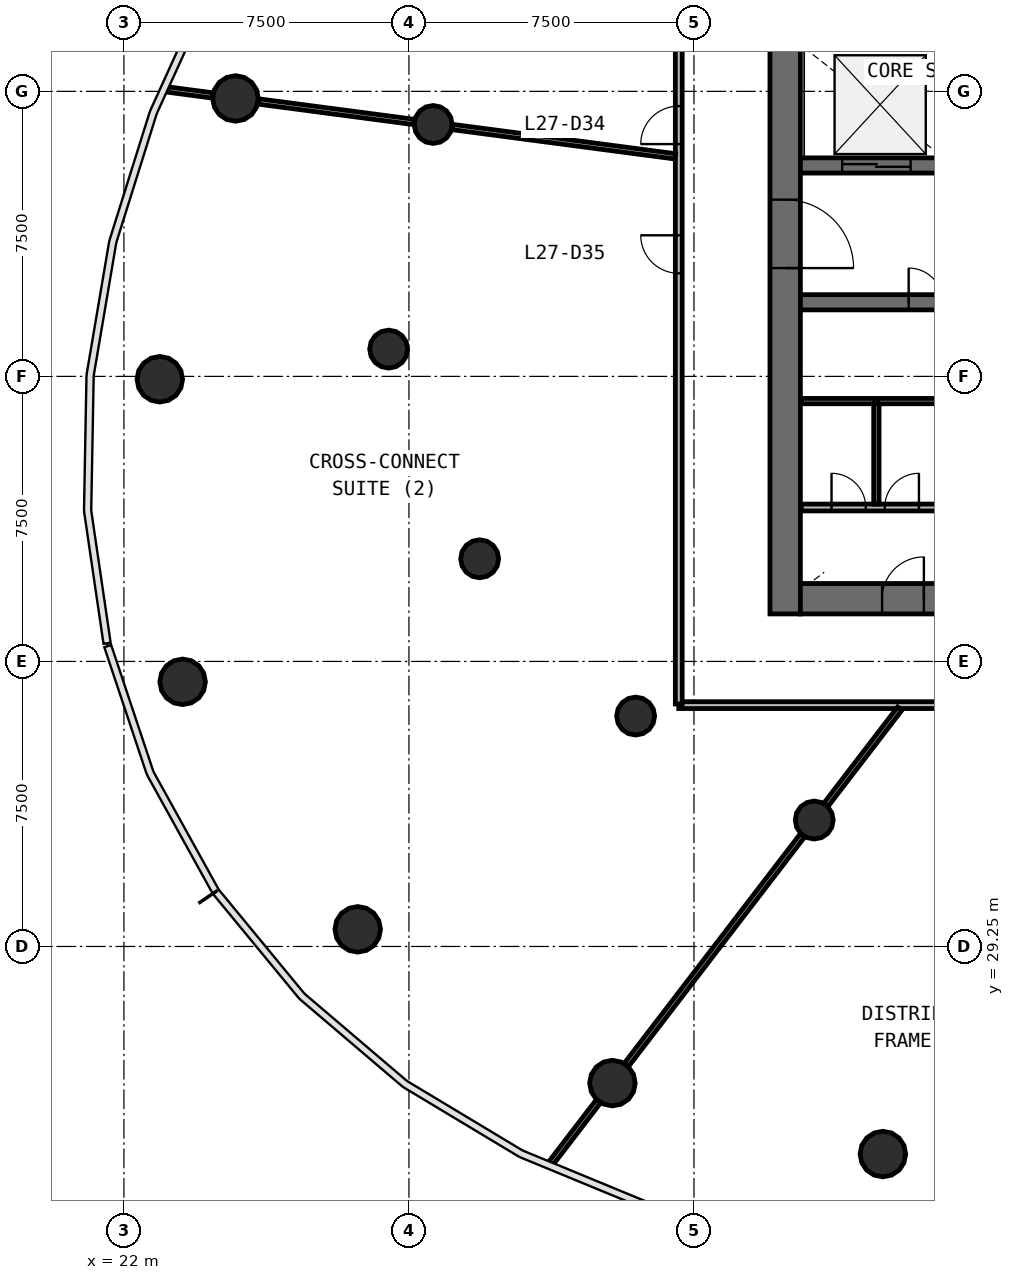
"""IFC4 building model, lengths in metres.
Left out: names, types, materials, properties, quantities, classifications, styles, units other than length and angle.
Written with IfcOpenShell. Run it as: python <this file> out.ifc"""

import sys

from ifc_helpers import new_model, si_unit, direction, frame, frame_2d, origin, origin_2d, place, context, subcontext, project, spatial, rectangle, circle, extrude, source, transform, mapped, element, fill, save


model = new_model("IFC4")
c1 = context("Model", 3, precision=1e-05, world=origin(), true_north=direction((0.0, 1.0)))
c2 = subcontext(c1, "Body", "Model", "MODEL_VIEW")
j1 = project(units=[si_unit("LENGTHUNIT", "METRE"), si_unit("PLANEANGLEUNIT", "RADIAN")], contexts=[c1])
p1 = place(None, origin())
s1 = spatial("IfcSite", under=j1, at=p1, CompositionType="ELEMENT")
p2 = place(p1, origin())
s2 = spatial("IfcBuilding", under=s1, at=p2, CompositionType="ELEMENT")
p3 = place(p2, frame((0.0, 0.0, 116.7)))
s3 = spatial("IfcBuildingStorey", under=s2, at=p3, CompositionType="ELEMENT", Elevation=116.7)
p4 = place(p3, frame((39.4, 58.0, 0.0), z_axis=(0.0, 0.0, 1.0), x_axis=(0.0, -1.0, 0.0)))
e1 = element("IfcWall", 1, at=p4, inside=s3, PredefinedType="SHEAR", context=c2, shape_type="SweptSolid", body=[
    extrude(rectangle(XDim=20.0, YDim=0.8, at=frame_2d((10.0, 0.0))), origin(), (0.0, 0.0, 1.0), 4.1),
])
p5 = place(p4, frame((9.1, 0.0, 0.0)))
e2 = element("IfcOpeningElement", 2, at=p5, cuts=e1, PredefinedType="OPENING", context=c2, shape_type="SweptSolid", body=[
    extrude(rectangle(XDim=1.8, YDim=2.1, at=frame_2d((0.9, 1.05))), frame((0.0, 0.41, 0.0), z_axis=(0.0, -1.0, 0.0), x_axis=(1.0, 0.0, 0.0)), (0.0, 0.0, 1.0), 0.82),
])
p6 = place(p3, frame((39.8, 38.4, 0.0), z_axis=(0.0, 0.0, 1.0), x_axis=(1.0, 0.0, 0.0)))
e3 = element("IfcWall", 3, at=p6, inside=s3, PredefinedType="SHEAR", context=c2, shape_type="SweptSolid", body=[
    extrude(rectangle(XDim=24.4, YDim=0.8, at=frame_2d((12.2, 0.0))), origin(), (0.0, 0.0, 1.0), 4.1),
])
p7 = place(p6, frame((21.65, 0.0, 0.0)))
e4 = element("IfcOpeningElement", 4, at=p7, cuts=e3, PredefinedType="OPENING", context=c2, shape_type="SweptSolid", body=[
    extrude(rectangle(XDim=1.1, YDim=2.1, at=frame_2d((0.55, 1.05))), frame((0.0, 0.41, 0.0), z_axis=(0.0, -1.0, 0.0), x_axis=(1.0, 0.0, 0.0)), (0.0, 0.0, 1.0), 0.82),
])
p8 = place(p6, frame((2.15, 0.0, 0.0)))
e5 = element("IfcOpeningElement", 5, at=p8, cuts=e3, PredefinedType="OPENING", context=c2, shape_type="SweptSolid", body=[
    extrude(rectangle(XDim=1.1, YDim=2.1, at=frame_2d((0.55, 1.05))), frame((0.0, 0.41, 0.0), z_axis=(0.0, -1.0, 0.0), x_axis=(1.0, 0.0, 0.0)), (0.0, 0.0, 1.0), 0.82),
])
p9 = place(p3, frame((39.8, 49.8, 0.0), z_axis=(0.0, 0.0, 1.0), x_axis=(1.0, 0.0, 0.0)))
e6 = element("IfcWall", 6, at=p9, inside=s3, PredefinedType="SHEAR", context=c2, shape_type="SweptSolid", body=[
    extrude(rectangle(XDim=24.4, YDim=0.4, at=frame_2d((12.2, 0.0))), origin(), (0.0, 0.0, 1.0), 4.1),
])
p10 = place(p9, frame((4.7, 0.0, 0.0)))
e7 = element("IfcOpeningElement", 7, at=p10, cuts=e6, PredefinedType="OPENING", context=c2, shape_type="SweptSolid", body=[
    extrude(rectangle(XDim=1.1, YDim=2.1, at=frame_2d((0.55, 1.05))), frame((0.0, 0.21, 0.0), z_axis=(0.0, -1.0, 0.0), x_axis=(1.0, 0.0, 0.0)), (0.0, 0.0, 1.0), 0.42),
])
p11 = place(p9, frame((7.2, 0.0, 0.0)))
e8 = element("IfcOpeningElement", 8, at=p11, cuts=e6, PredefinedType="OPENING", context=c2, shape_type="SweptSolid", body=[
    extrude(rectangle(XDim=1.1, YDim=2.1, at=frame_2d((0.55, 1.05))), frame((0.0, 0.21, 0.0), z_axis=(0.0, -1.0, 0.0), x_axis=(1.0, 0.0, 0.0)), (0.0, 0.0, 1.0), 0.42),
])
p12 = place(p9, frame((9.7, 0.0, 0.0)))
e9 = element("IfcOpeningElement", 9, at=p12, cuts=e6, PredefinedType="OPENING", context=c2, shape_type="SweptSolid", body=[
    extrude(rectangle(XDim=1.1, YDim=2.1, at=frame_2d((0.55, 1.05))), frame((0.0, 0.21, 0.0), z_axis=(0.0, -1.0, 0.0), x_axis=(1.0, 0.0, 0.0)), (0.0, 0.0, 1.0), 0.42),
])
p13 = place(p9, frame((1.1, 0.0, 0.0)))
e10 = element("IfcOpeningElement", 10, at=p13, cuts=e6, PredefinedType="OPENING", context=c2, shape_type="SweptSolid", body=[
    extrude(rectangle(XDim=1.8, YDim=2.4, at=frame_2d((0.9, 1.2))), frame((0.0, 0.21, 0.0), z_axis=(0.0, -1.0, 0.0), x_axis=(1.0, 0.0, 0.0)), (0.0, 0.0, 1.0), 0.42),
])
p14 = place(p9, frame((20.65, 0.0, 0.0)))
e11 = element("IfcOpeningElement", 11, at=p14, cuts=e6, PredefinedType="OPENING", context=c2, shape_type="SweptSolid", body=[
    extrude(rectangle(XDim=0.9, YDim=2.1, at=frame_2d((0.45, 1.05))), frame((0.0, 0.21, 0.0), z_axis=(0.0, -1.0, 0.0), x_axis=(1.0, 0.0, 0.0)), (0.0, 0.0, 1.0), 0.42),
])
p15 = place(p9, frame((22.65, 0.0, 0.0)))
e12 = element("IfcOpeningElement", 12, at=p15, cuts=e6, PredefinedType="OPENING", context=c2, shape_type="SweptSolid", body=[
    extrude(rectangle(XDim=0.9, YDim=2.1, at=frame_2d((0.45, 1.05))), frame((0.0, 0.21, 0.0), z_axis=(0.0, -1.0, 0.0), x_axis=(1.0, 0.0, 0.0)), (0.0, 0.0, 1.0), 0.42),
])
p16 = place(p9, frame((11.85, 0.0, 0.0)))
e13 = element("IfcOpeningElement", 13, at=p16, cuts=e6, PredefinedType="OPENING", context=c2, shape_type="SweptSolid", body=[
    extrude(rectangle(XDim=0.9, YDim=2.1, at=frame_2d((0.45, 1.05))), frame((0.0, 0.21, 0.0), z_axis=(0.0, -1.0, 0.0), x_axis=(1.0, 0.0, 0.0)), (0.0, 0.0, 1.0), 0.42),
])
p17 = place(p3, frame((39.8, 46.2, 0.0), z_axis=(0.0, 0.0, 1.0), x_axis=(1.0, 0.0, 0.0)))
e14 = element("IfcWall", 14, at=p17, inside=s3, PredefinedType="SHEAR", context=c2, shape_type="SweptSolid", body=[
    extrude(rectangle(XDim=24.4, YDim=0.4, at=frame_2d((12.2, 0.0))), origin(), (0.0, 0.0, 1.0), 4.1),
])
p18 = place(p17, frame((4.7, 0.0, 0.0)))
e15 = element("IfcOpeningElement", 15, at=p18, cuts=e14, PredefinedType="OPENING", context=c2, shape_type="SweptSolid", body=[
    extrude(rectangle(XDim=1.1, YDim=2.1, at=frame_2d((0.55, 1.05))), frame((0.0, 0.21, 0.0), z_axis=(0.0, -1.0, 0.0), x_axis=(1.0, 0.0, 0.0)), (0.0, 0.0, 1.0), 0.42),
])
p19 = place(p17, frame((7.2, 0.0, 0.0)))
e16 = element("IfcOpeningElement", 16, at=p19, cuts=e14, PredefinedType="OPENING", context=c2, shape_type="SweptSolid", body=[
    extrude(rectangle(XDim=1.1, YDim=2.1, at=frame_2d((0.55, 1.05))), frame((0.0, 0.21, 0.0), z_axis=(0.0, -1.0, 0.0), x_axis=(1.0, 0.0, 0.0)), (0.0, 0.0, 1.0), 0.42),
])
p20 = place(p17, frame((9.7, 0.0, 0.0)))
e17 = element("IfcOpeningElement", 17, at=p20, cuts=e14, PredefinedType="OPENING", context=c2, shape_type="SweptSolid", body=[
    extrude(rectangle(XDim=1.1, YDim=2.1, at=frame_2d((0.55, 1.05))), frame((0.0, 0.21, 0.0), z_axis=(0.0, -1.0, 0.0), x_axis=(1.0, 0.0, 0.0)), (0.0, 0.0, 1.0), 0.42),
])
p21 = place(p17, frame((20.65, 0.0, 0.0)))
e18 = element("IfcOpeningElement", 18, at=p21, cuts=e14, PredefinedType="OPENING", context=c2, shape_type="SweptSolid", body=[
    extrude(rectangle(XDim=0.9, YDim=2.1, at=frame_2d((0.45, 1.05))), frame((0.0, 0.21, 0.0), z_axis=(0.0, -1.0, 0.0), x_axis=(1.0, 0.0, 0.0)), (0.0, 0.0, 1.0), 0.42),
])
p22 = place(p17, frame((2.85, 0.0, 0.0)))
e19 = element("IfcOpeningElement", 19, at=p22, cuts=e14, PredefinedType="OPENING", context=c2, shape_type="SweptSolid", body=[
    extrude(rectangle(XDim=0.9, YDim=2.1, at=frame_2d((0.45, 1.05))), frame((0.0, 0.21, 0.0), z_axis=(0.0, -1.0, 0.0), x_axis=(1.0, 0.0, 0.0)), (0.0, 0.0, 1.0), 0.42),
])
p23 = place(p17, frame((11.85, 0.0, 0.0)))
e20 = element("IfcOpeningElement", 20, at=p23, cuts=e14, PredefinedType="OPENING", context=c2, shape_type="SweptSolid", body=[
    extrude(rectangle(XDim=0.9, YDim=2.1, at=frame_2d((0.45, 1.05))), frame((0.0, 0.21, 0.0), z_axis=(0.0, -1.0, 0.0), x_axis=(1.0, 0.0, 0.0)), (0.0, 0.0, 1.0), 0.42),
])
m1 = source(origin(), c2, "Body", "SweptSolid", [
    extrude(circle(Radius=0.6, at=origin_2d()), origin(), (0.0, 0.0, 1.0), 4.1),
])
for number, where, z_axis, x_axis in (
    (21, (24.936, 51.563, 0.0), (0.0, 0.0, 1.0), (1.0, 0.0, 0.0)),
    (22, (22.944, 44.175, 0.0), (0.0, 0.0, 1.0), (1.0, 0.0, 0.0)),
    (23, (23.544, 36.213, 0.0), (0.0, 0.0, 1.0), (1.0, 0.0, 0.0)),
    (24, (28.152, 29.701, 0.0), (0.0, 0.0, 1.0), (1.0, 0.0, 0.0)),
    (25, (34.854, 25.655, 0.0), (0.0, 0.0, 1.0), (1.0, 0.0, 0.0)),
    (26, (41.971, 23.788, 0.0), (0.0, 0.0, 1.0), (1.0, 0.0, 0.0)),
):
    element("IfcColumn", number, at=place(p3, frame(where, z_axis=z_axis, x_axis=x_axis)), inside=s3, PredefinedType="COLUMN", context=c2, shape_type="MappedRepresentation", body=[
        mapped(m1, transform((0.0, 0.0, 0.0), scale=1.0)),
    ])
m2 = source(origin(), c2, "Body", "SweptSolid", [
    extrude(circle(Radius=0.5, at=origin_2d()), origin(), (0.0, 0.0, 1.0), 4.1),
])
for number, where, z_axis, x_axis in (
    (27, (30.137, 50.878, 0.0), (0.0, 0.0, 1.0), (1.0, 0.0, 0.0)),
    (28, (28.966, 44.968, 0.0), (0.0, 0.0, 1.0), (1.0, 0.0, 0.0)),
    (29, (31.361, 39.451, 0.0), (0.0, 0.0, 1.0), (1.0, 0.0, 0.0)),
    (30, (35.465, 35.312, 0.0), (0.0, 0.0, 1.0), (1.0, 0.0, 0.0)),
    (31, (40.165, 32.576, 0.0), (0.0, 0.0, 1.0), (1.0, 0.0, 0.0)),
):
    element("IfcColumn", number, at=place(p3, frame(where, z_axis=z_axis, x_axis=x_axis)), inside=s3, PredefinedType="COLUMN", context=c2, shape_type="MappedRepresentation", body=[
        mapped(m2, transform((0.0, 0.0, 0.0), scale=1.0)),
    ])
p24 = place(p3, frame((67.4, 35.6, 0.0), z_axis=(0.0, 0.0, 1.0), x_axis=(-1.0, 0.0, 0.0)))
e32 = element("IfcWall", 32, at=p24, inside=s3, PredefinedType="PARTITIONING", context=c2, shape_type="SweptSolid", body=[
    extrude(rectangle(XDim=30.8, YDim=0.18, at=frame_2d((15.4, 0.0))), origin(), (0.0, 0.0, 1.0), 2.9),
])
p25 = place(p24, frame((17.35, 0.0, 0.0)))
e33 = element("IfcOpeningElement", 33, at=p25, cuts=e32, PredefinedType="OPENING", context=c2, shape_type="SweptSolid", body=[
    extrude(rectangle(XDim=1.0, YDim=2.1, at=frame_2d((0.5, 1.05))), frame((0.0, 0.1, 0.0), z_axis=(0.0, -1.0, 0.0), x_axis=(1.0, 0.0, 0.0)), (0.0, 0.0, 1.0), 0.2),
])
p26 = place(p24, frame((14.95, 0.0, 0.0)))
e34 = element("IfcOpeningElement", 34, at=p26, cuts=e32, PredefinedType="OPENING", context=c2, shape_type="SweptSolid", body=[
    extrude(rectangle(XDim=1.0, YDim=2.1, at=frame_2d((0.5, 1.05))), frame((0.0, 0.1, 0.0), z_axis=(0.0, -1.0, 0.0), x_axis=(1.0, 0.0, 0.0)), (0.0, 0.0, 1.0), 0.2),
])
p27 = place(p24, frame((4.35, 0.0, 0.0)))
e35 = element("IfcOpeningElement", 35, at=p27, cuts=e32, PredefinedType="OPENING", context=c2, shape_type="SweptSolid", body=[
    extrude(rectangle(XDim=1.0, YDim=2.1, at=frame_2d((0.5, 1.05))), frame((0.0, 0.1, 0.0), z_axis=(0.0, -1.0, 0.0), x_axis=(1.0, 0.0, 0.0)), (0.0, 0.0, 1.0), 0.2),
])
p28 = place(p3, frame((36.6, 35.63, 0.0), z_axis=(0.0, 0.0, 1.0), x_axis=(0.0, 1.0, 0.0)))
e36 = element("IfcWall", 36, at=p28, inside=s3, PredefinedType="PARTITIONING", context=c2, shape_type="SweptSolid", body=[
    extrude(rectangle(XDim=23.583, YDim=0.18, at=frame_2d((11.791, 0.0))), origin(), (0.0, 0.0, 1.0), 2.9),
])
p29 = place(p28, frame((14.732, 0.0, 0.0)))
e37 = element("IfcOpeningElement", 37, at=p29, cuts=e36, PredefinedType="OPENING", context=c2, shape_type="SweptSolid", body=[
    extrude(rectangle(XDim=1.0, YDim=2.1, at=frame_2d((0.5, 1.05))), frame((0.0, 0.1, 0.0), z_axis=(0.0, -1.0, 0.0), x_axis=(1.0, 0.0, 0.0)), (0.0, 0.0, 1.0), 0.2),
])
p30 = place(p28, frame((11.333, 0.0, 0.0)))
e38 = element("IfcOpeningElement", 38, at=p30, cuts=e36, PredefinedType="OPENING", context=c2, shape_type="SweptSolid", body=[
    extrude(rectangle(XDim=1.0, YDim=2.1, at=frame_2d((0.5, 1.05))), frame((0.0, 0.1, 0.0), z_axis=(0.0, -1.0, 0.0), x_axis=(1.0, 0.0, 0.0)), (0.0, 0.0, 1.0), 0.2),
])
p31 = place(p3, frame((39.82, 40.8, 0.0), z_axis=(0.0, 0.0, 1.0), x_axis=(1.0, 0.0, 0.0)))
e39 = element("IfcWall", 39, at=p31, inside=s3, PredefinedType="PARTITIONING", context=c2, shape_type="SweptSolid", body=[
    extrude(rectangle(XDim=3.95, YDim=0.18, at=frame_2d((1.975, 0.0))), origin(), (0.0, 0.0, 1.0), 3.7),
])
p32 = place(p31, frame((0.8, 0.0, 0.0)))
e40 = element("IfcOpeningElement", 40, at=p32, cuts=e39, PredefinedType="OPENING", context=c2, shape_type="SweptSolid", body=[
    extrude(rectangle(XDim=0.9, YDim=2.1, at=frame_2d((0.45, 1.05))), frame((0.0, 0.1, 0.0), z_axis=(0.0, -1.0, 0.0), x_axis=(1.0, 0.0, 0.0)), (0.0, 0.0, 1.0), 0.2),
])
p33 = place(p31, frame((2.2, 0.0, 0.0)))
e41 = element("IfcOpeningElement", 41, at=p33, cuts=e39, PredefinedType="OPENING", context=c2, shape_type="SweptSolid", body=[
    extrude(rectangle(XDim=0.9, YDim=2.1, at=frame_2d((0.45, 1.05))), frame((0.0, 0.1, 0.0), z_axis=(0.0, -1.0, 0.0), x_axis=(1.0, 0.0, 0.0)), (0.0, 0.0, 1.0), 0.2),
])
p34 = place(p3, frame((39.858, 32.176, 0.0), z_axis=(0.0, 0.0, 1.0), x_axis=(-0.608755907151, -0.793357577331, 0.0)))
e42 = element("IfcWall", 42, at=p34, inside=s3, PredefinedType="PARTITIONING", context=c2, shape_type="SweptSolid", body=[
    extrude(rectangle(XDim=7.615, YDim=0.14, at=frame_2d((3.808, 0.0))), origin(), (0.0, 0.0, 1.0), 2.9),
])
p35 = place(p3, frame((36.51, 50.039, 0.0), z_axis=(0.0, 0.0, 1.0), x_axis=(-0.991445034615, 0.130524876315, 0.0)))
e43 = element("IfcWall", 43, at=p35, inside=s3, PredefinedType="PARTITIONING", context=c2, shape_type="SweptSolid", body=[
    extrude(rectangle(XDim=5.924, YDim=0.14, at=frame_2d((2.962, 0.0))), origin(), (0.0, 0.0, 1.0), 2.9),
])
p36 = place(p3, frame((29.637, 50.944, 0.0), z_axis=(0.0, 0.0, 1.0), x_axis=(-0.991445054296, 0.130524726824, 0.0)))
e44 = element("IfcWall", 44, at=p36, inside=s3, PredefinedType="PARTITIONING", context=c2, shape_type="SweptSolid", body=[
    extrude(rectangle(XDim=4.137, YDim=0.14, at=frame_2d((2.069, 0.0))), origin(), (0.0, 0.0, 1.0), 2.9),
])
p37 = place(p3, frame((42.416, 35.51, 0.0), z_axis=(0.0, 0.0, 1.0), x_axis=(-0.60874605662, -0.793365135703, 0.0)))
e45 = element("IfcWall", 45, at=p37, inside=s3, PredefinedType="PARTITIONING", context=c2, shape_type="SweptSolid", body=[
    extrude(rectangle(XDim=3.194, YDim=0.14, at=frame_2d((1.597, 0.0))), origin(), (0.0, 0.0, 1.0), 2.9),
])
p38 = place(p3, frame((41.8, 40.89, 0.0), z_axis=(0.0, 0.0, 1.0), x_axis=(0.0, 1.0, 0.0)))
e46 = element("IfcWall", 46, at=p38, inside=s3, PredefinedType="PARTITIONING", context=c2, shape_type="SweptSolid", body=[
    extrude(rectangle(XDim=2.71, YDim=0.14, at=frame_2d((1.355, 0.0))), origin(), (0.0, 0.0, 1.0), 2.9),
])
p39 = place(p3, frame((34.486, 25.176, 0.0), z_axis=(0.0, 0.0, 1.0), x_axis=(-0.608718034157, -0.793386636447, 0.0)))
e47 = element("IfcWall", 47, at=p39, inside=s3, PredefinedType="PARTITIONING", context=c2, shape_type="SweptSolid", body=[
    extrude(rectangle(XDim=2.057, YDim=0.14, at=frame_2d((1.029, 0.0))), origin(), (0.0, 0.0, 1.0), 2.9),
])
p40 = place(p3, frame((43.77, 43.6, 0.0), z_axis=(0.0, 0.0, 1.0), x_axis=(-1.0, 0.0, 0.0)))
e48 = element("IfcWall", 48, at=p40, inside=s3, PredefinedType="PARTITIONING", context=c2, shape_type="SweptSolid", body=[
    extrude(rectangle(XDim=1.94, YDim=0.14, at=frame_2d((0.97, 0.0))), origin(), (0.0, 0.0, 1.0), 2.9),
])
p41 = place(p3, frame((41.77, 43.6, 0.0), z_axis=(0.0, 0.0, 1.0), x_axis=(-1.0, 0.0, 0.0)))
e49 = element("IfcWall", 49, at=p41, inside=s3, PredefinedType="PARTITIONING", context=c2, shape_type="SweptSolid", body=[
    extrude(rectangle(XDim=1.95, YDim=0.14, at=frame_2d((0.975, 0.0))), origin(), (0.0, 0.0, 1.0), 2.9),
])
p42 = place(p3, frame((24.336, 51.642, 0.0), z_axis=(0.0, 0.0, 1.0), x_axis=(-0.991444694364, 0.130527460778, 0.0)))
e50 = element("IfcWall", 50, at=p42, inside=s3, PredefinedType="PARTITIONING", context=c2, shape_type="SweptSolid", body=[
    extrude(rectangle(XDim=1.212, YDim=0.14, at=frame_2d((0.606, 0.0))), origin(), (0.0, 0.0, 1.0), 2.9),
])
m3 = source(origin(), c2, "Body", "SweptSolid", [
    extrude(rectangle(XDim=1.8, YDim=2.1, at=frame_2d((0.9, 1.05))), frame((0.0, 0.025, 0.0), z_axis=(0.0, -1.0, 0.0), x_axis=(1.0, 0.0, 0.0)), (0.0, 0.0, 1.0), 0.05),
])
p43 = place(p5, origin())
e51 = element("IfcDoor", 51, at=p43, inside=s3, OperationType="SINGLE_SWING_RIGHT", PredefinedType="DOOR", context=c2, shape_type="MappedRepresentation", body=[
    mapped(m3, transform((0.0, 0.0, 0.0), scale=1.0)),
])
fill(e2, e51)
m4 = source(origin(), c2, "Body", "SweptSolid", [
    extrude(rectangle(XDim=1.8, YDim=2.4, at=frame_2d((0.9, 1.2))), frame((0.0, 0.025, 0.0), z_axis=(0.0, -1.0, 0.0), x_axis=(1.0, 0.0, 0.0)), (0.0, 0.0, 1.0), 0.05),
])
p44 = place(p13, origin())
e52 = element("IfcDoor", 52, at=p44, inside=s3, OperationType="DOUBLE_DOOR_SLIDING", PredefinedType="USERDEFINED", context=c2, shape_type="MappedRepresentation", body=[
    mapped(m4, transform((0.0, 0.0, 0.0), scale=1.0)),
])
fill(e10, e52)
m5 = source(origin(), c2, "Body", "SweptSolid", [
    extrude(rectangle(XDim=1.1, YDim=2.1, at=frame_2d((0.55, 1.05))), frame((0.0, 0.025, 0.0), z_axis=(0.0, -1.0, 0.0), x_axis=(1.0, 0.0, 0.0)), (0.0, 0.0, 1.0), 0.05),
])
p45 = place(p8, origin())
e53 = element("IfcDoor", 53, at=p45, inside=s3, OperationType="SINGLE_SWING_RIGHT", PredefinedType="DOOR", context=c2, shape_type="MappedRepresentation", body=[
    mapped(m5, transform((0.0, 0.0, 0.0), scale=1.0)),
])
fill(e5, e53)
m6 = source(origin(), c2, "Body", "SweptSolid", [
    extrude(rectangle(XDim=1.0, YDim=2.1, at=frame_2d((0.5, 1.05))), frame((0.0, 0.025, 0.0), z_axis=(0.0, -1.0, 0.0), x_axis=(1.0, 0.0, 0.0)), (0.0, 0.0, 1.0), 0.05),
])
p46 = place(p29, origin())
e54 = element("IfcDoor", 54, at=p46, inside=s3, OperationType="SINGLE_SWING_LEFT", PredefinedType="DOOR", context=c2, shape_type="MappedRepresentation", body=[
    mapped(m6, transform((0.0, 0.0, 0.0), scale=1.0)),
])
fill(e37, e54)
p47 = place(p30, origin())
e55 = element("IfcDoor", 55, at=p47, inside=s3, OperationType="SINGLE_SWING_RIGHT", PredefinedType="DOOR", context=c2, shape_type="MappedRepresentation", body=[
    mapped(m6, transform((0.0, 0.0, 0.0), scale=1.0)),
])
fill(e38, e55)
m7 = source(origin(), c2, "Body", "SweptSolid", [
    extrude(rectangle(XDim=0.9, YDim=2.1, at=frame_2d((0.45, 1.05))), frame((0.0, 0.025, 0.0), z_axis=(0.0, -1.0, 0.0), x_axis=(1.0, 0.0, 0.0)), (0.0, 0.0, 1.0), 0.05),
])
p48 = place(p32, origin())
e56 = element("IfcDoor", 56, at=p48, inside=s3, OperationType="SINGLE_SWING_LEFT", PredefinedType="DOOR", context=c2, shape_type="MappedRepresentation", body=[
    mapped(m7, transform((0.0, 0.0, 0.0), scale=1.0)),
])
fill(e40, e56)
p49 = place(p33, origin())
e57 = element("IfcDoor", 57, at=p49, inside=s3, OperationType="SINGLE_SWING_RIGHT", PredefinedType="DOOR", context=c2, shape_type="MappedRepresentation", body=[
    mapped(m7, transform((0.0, 0.0, 0.0), scale=1.0)),
])
fill(e41, e57)
p50 = place(p22, origin())
e58 = element("IfcDoor", 58, at=p50, inside=s3, OperationType="SINGLE_SWING_LEFT", PredefinedType="DOOR", context=c2, shape_type="MappedRepresentation", body=[
    mapped(m7, transform((0.0, 0.0, 0.0), scale=1.0)),
])
fill(e19, e58)
save(model, sys.argv[1])
